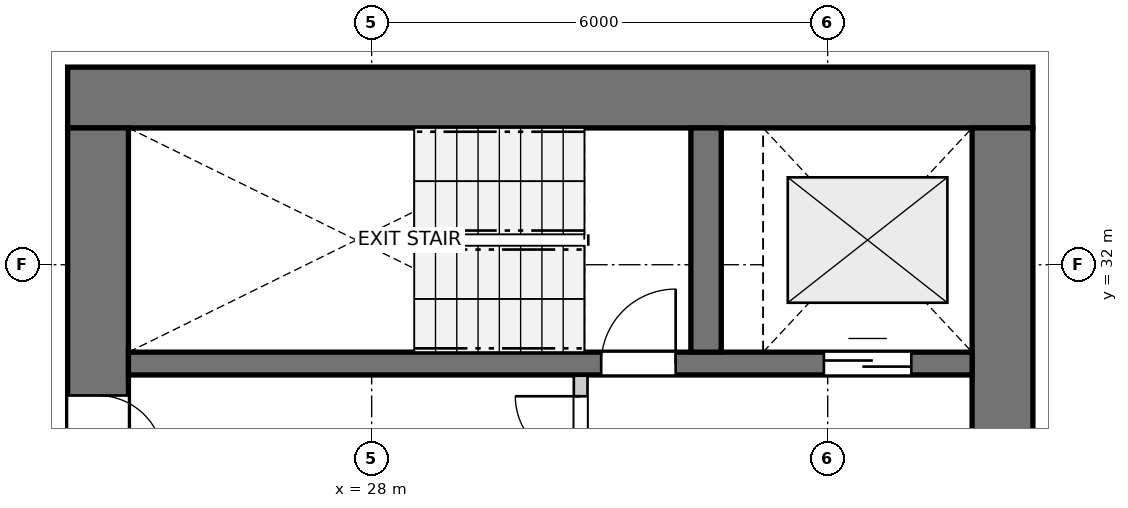
"""IFC4 building model, lengths in metres.
Left out: names, types, materials, properties, quantities, classifications, styles, units other than length and angle.
Written with IfcOpenShell. Run it as: python <this file> out.ifc"""

import sys

from ifc_helpers import new_model, si_unit, direction, frame, frame_2d, origin, place, context, subcontext, project, spatial, rectangle, extrude, source, transform, mapped, element, fill, save


model = new_model("IFC4")
c1 = context("Model", 3, precision=1e-05, world=origin(), true_north=direction((0.0, 1.0)))
c2 = subcontext(c1, "Body", "Model", "MODEL_VIEW")
j1 = project(units=[si_unit("LENGTHUNIT", "METRE"), si_unit("PLANEANGLEUNIT", "RADIAN")], contexts=[c1])
p1 = place(None, origin())
s1 = spatial("IfcSite", under=j1, at=p1, CompositionType="ELEMENT")
p2 = place(p1, origin())
s2 = spatial("IfcBuilding", under=s1, at=p2, CompositionType="ELEMENT")
p3 = place(p2, frame((0.0, 0.0, 43.0)))
s3 = spatial("IfcBuildingStorey", under=s2, at=p3, CompositionType="ELEMENT", Elevation=43.0)
p4 = place(p3, frame((36.7, 34.2, 0.0), z_axis=(0.0, 0.0, 1.0), x_axis=(-1.0, 0.0, 0.0)))
e1 = element("IfcWall", 1, at=p4, inside=s3, PredefinedType="SHEAR", context=c2, shape_type="SweptSolid", body=[
    extrude(rectangle(XDim=12.7, YDim=0.8, at=frame_2d((6.35, 0.0))), origin(), (0.0, 0.0, 1.0), 2.94),
])
p5 = place(p3, frame((24.4, 33.8, 0.0), z_axis=(0.0, 0.0, 1.0), x_axis=(0.0, -1.0, 0.0)))
e2 = element("IfcWall", 2, at=p5, inside=s3, PredefinedType="SHEAR", context=c2, shape_type="SweptSolid", body=[
    extrude(rectangle(XDim=15.6, YDim=0.8, at=frame_2d((7.8, 0.0))), origin(), (0.0, 0.0, 1.0), 2.94),
])
p6 = place(p5, frame((7.05, 0.0, 0.0)))
e3 = element("IfcOpeningElement", 3, at=p6, cuts=e2, PredefinedType="OPENING", context=c2, shape_type="SweptSolid", body=[
    extrude(rectangle(XDim=1.5, YDim=2.15, at=frame_2d((0.75, 1.075))), frame((0.0, 0.41, 0.0), z_axis=(0.0, -1.0, 0.0), x_axis=(1.0, 0.0, 0.0)), (0.0, 0.0, 1.0), 0.82),
])
p7 = place(p5, frame((3.52, 0.0, 0.0)))
e4 = element("IfcOpeningElement", 4, at=p7, cuts=e2, PredefinedType="OPENING", context=c2, shape_type="SweptSolid", body=[
    extrude(rectangle(XDim=0.86, YDim=2.05, at=frame_2d((0.43, 1.025))), frame((0.0, 0.41, 0.0), z_axis=(0.0, -1.0, 0.0), x_axis=(1.0, 0.0, 0.0)), (0.0, 0.0, 1.0), 0.82),
])
p8 = place(p5, frame((11.22, 0.0, 0.0)))
e5 = element("IfcOpeningElement", 5, at=p8, cuts=e2, PredefinedType="OPENING", context=c2, shape_type="SweptSolid", body=[
    extrude(rectangle(XDim=0.86, YDim=2.05, at=frame_2d((0.43, 1.025))), frame((0.0, 0.41, 0.0), z_axis=(0.0, -1.0, 0.0), x_axis=(1.0, 0.0, 0.0)), (0.0, 0.0, 1.0), 0.82),
])
p9 = place(p3, frame((36.3, 18.2, 0.0), z_axis=(0.0, 0.0, 1.0), x_axis=(0.0, 1.0, 0.0)))
e6 = element("IfcWall", 6, at=p9, inside=s3, PredefinedType="SHEAR", context=c2, shape_type="SweptSolid", body=[
    extrude(rectangle(XDim=15.6, YDim=0.8, at=frame_2d((7.8, 0.0))), origin(), (0.0, 0.0, 1.0), 2.94),
])
p10 = place(p9, frame((4.25, 0.0, 0.0)))
e7 = element("IfcOpeningElement", 7, at=p10, cuts=e6, PredefinedType="OPENING", context=c2, shape_type="SweptSolid", body=[
    extrude(rectangle(XDim=1.1, YDim=2.15, at=frame_2d((0.55, 1.075))), frame((0.0, 0.41, 0.0), z_axis=(0.0, -1.0, 0.0), x_axis=(1.0, 0.0, 0.0)), (0.0, 0.0, 1.0), 0.82),
])
p11 = place(p9, frame((10.25, 0.0, 0.0)))
e8 = element("IfcOpeningElement", 8, at=p11, cuts=e6, PredefinedType="OPENING", context=c2, shape_type="SweptSolid", body=[
    extrude(rectangle(XDim=1.1, YDim=2.15, at=frame_2d((0.55, 1.075))), frame((0.0, 0.41, 0.0), z_axis=(0.0, -1.0, 0.0), x_axis=(1.0, 0.0, 0.0)), (0.0, 0.0, 1.0), 0.82),
])
p12 = place(p3, frame((24.8, 30.7, 0.0), z_axis=(0.0, 0.0, 1.0), x_axis=(1.0, 0.0, 0.0)))
e9 = element("IfcWall", 9, at=p12, inside=s3, PredefinedType="SHEAR", context=c2, shape_type="SweptSolid", body=[
    extrude(rectangle(XDim=11.1, YDim=0.3, at=frame_2d((5.55, 0.0))), origin(), (0.0, 0.0, 1.0), 2.94),
])
p13 = place(p12, frame((6.22, 0.0, 0.0)))
e10 = element("IfcOpeningElement", 10, at=p13, cuts=e9, PredefinedType="OPENING", context=c2, shape_type="SweptSolid", body=[
    extrude(rectangle(XDim=0.98, YDim=2.15, at=frame_2d((0.49, 1.075))), frame((0.0, 0.16, 0.0), z_axis=(0.0, -1.0, 0.0), x_axis=(1.0, 0.0, 0.0)), (0.0, 0.0, 1.0), 0.32),
])
p14 = place(p12, frame((9.15, 0.0, 0.0)))
e11 = element("IfcOpeningElement", 11, at=p14, cuts=e9, PredefinedType="OPENING", context=c2, shape_type="SweptSolid", body=[
    extrude(rectangle(XDim=1.15, YDim=2.15, at=frame_2d((0.575, 1.075))), frame((0.0, 0.16, 0.0), z_axis=(0.0, -1.0, 0.0), x_axis=(1.0, 0.0, 0.0)), (0.0, 0.0, 1.0), 0.32),
])
p15 = place(p3, frame((32.4, 30.85, 0.0), z_axis=(0.0, 0.0, 1.0), x_axis=(0.0, 1.0, 0.0)))
e12 = element("IfcWall", 12, at=p15, inside=s3, PredefinedType="SHEAR", context=c2, shape_type="SweptSolid", body=[
    extrude(rectangle(XDim=2.95, YDim=0.4, at=frame_2d((1.475, 0.0))), origin(), (0.0, 0.0, 1.0), 2.94),
])
p16 = place(p3, frame((30.75, 27.43, 0.0), z_axis=(0.0, 0.0, 1.0), x_axis=(0.0, 1.0, 0.0)))
e13 = element("IfcWall", 13, at=p16, inside=s3, PredefinedType="PARTITIONING", context=c2, shape_type="SweptSolid", body=[
    extrude(rectangle(XDim=3.11, YDim=0.18, at=frame_2d((1.555, 0.0))), origin(), (0.0, 0.0, 1.0), 2.94),
])
p17 = place(p16, frame((1.98, 0.0, 0.0)))
e14 = element("IfcOpeningElement", 14, at=p17, cuts=e13, PredefinedType="OPENING", context=c2, shape_type="SweptSolid", body=[
    extrude(rectangle(XDim=0.86, YDim=2.05, at=frame_2d((0.43, 1.025))), frame((0.0, 0.1, 0.0), z_axis=(0.0, -1.0, 0.0), x_axis=(1.0, 0.0, 0.0)), (0.0, 0.0, 1.0), 0.2),
])
m1 = source(origin(), c2, "Body", "SweptSolid", [
    extrude(rectangle(XDim=0.98, YDim=2.15, at=frame_2d((0.49, 1.075))), frame((0.0, 0.025, 0.0), z_axis=(0.0, -1.0, 0.0), x_axis=(1.0, 0.0, 0.0)), (0.0, 0.0, 1.0), 0.05),
])
p18 = place(p13, origin())
e15 = element("IfcDoor", 15, at=p18, inside=s3, OperationType="SINGLE_SWING_RIGHT", PredefinedType="DOOR", context=c2, shape_type="MappedRepresentation", body=[
    mapped(m1, transform((0.0, 0.0, 0.0), x_axis=(1.0, 0.0, 0.0), y_axis=(0.0, 1.0, 0.0), z_axis=(0.0, 0.0, 1.0), scale=1.0)),
])
fill(e10, e15)
m2 = source(origin(), c2, "Body", "SweptSolid", [
    extrude(rectangle(XDim=1.15, YDim=2.15, at=frame_2d((0.575, 1.075))), frame((0.0, 0.025, 0.0), z_axis=(0.0, -1.0, 0.0), x_axis=(1.0, 0.0, 0.0)), (0.0, 0.0, 1.0), 0.05),
])
p19 = place(p14, origin())
e16 = element("IfcDoor", 16, at=p19, inside=s3, OperationType="DOUBLE_DOOR_SLIDING", PredefinedType="DOOR", context=c2, shape_type="MappedRepresentation", body=[
    mapped(m2, transform((0.0, 0.0, 0.0), x_axis=(1.0, 0.0, 0.0), y_axis=(0.0, 1.0, 0.0), z_axis=(0.0, 0.0, 1.0), scale=1.0)),
])
fill(e11, e16)
m3 = source(origin(), c2, "Body", "SweptSolid", [
    extrude(rectangle(XDim=0.86, YDim=2.05, at=frame_2d((0.43, 1.025))), frame((0.0, 0.025, 0.0), z_axis=(0.0, -1.0, 0.0), x_axis=(1.0, 0.0, 0.0)), (0.0, 0.0, 1.0), 0.05),
])
p20 = place(p7, origin())
e17 = element("IfcDoor", 17, at=p20, inside=s3, OperationType="SINGLE_SWING_RIGHT", PredefinedType="DOOR", context=c2, shape_type="MappedRepresentation", body=[
    mapped(m3, transform((0.0, 0.0, 0.0), x_axis=(1.0, 0.0, 0.0), y_axis=(0.0, 1.0, 0.0), z_axis=(0.0, 0.0, 1.0), scale=1.0)),
])
fill(e4, e17)
p21 = place(p17, origin())
e18 = element("IfcDoor", 18, at=p21, inside=s3, OperationType="SINGLE_SWING_RIGHT", PredefinedType="DOOR", context=c2, shape_type="MappedRepresentation", body=[
    mapped(m3, transform((0.0, 0.0, 0.0), x_axis=(1.0, 0.0, 0.0), y_axis=(0.0, 1.0, 0.0), z_axis=(0.0, 0.0, 1.0), scale=1.0)),
])
fill(e14, e18)
save(model, sys.argv[1])
